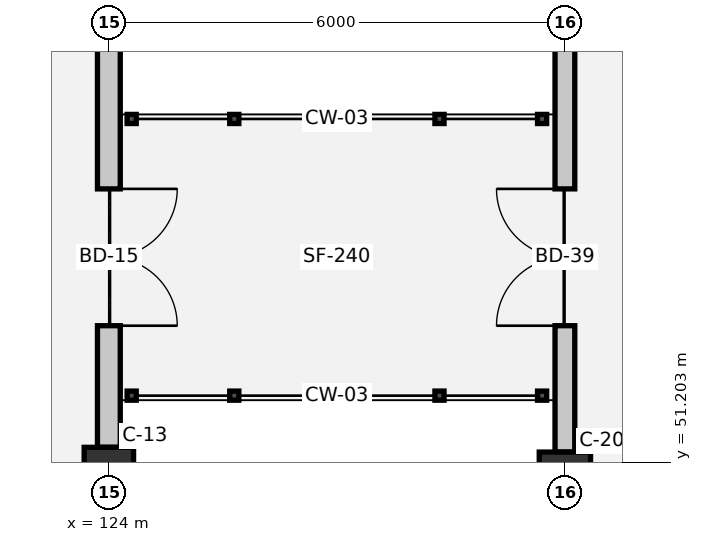
"""IFC4 building model, lengths in metres.
Left out: names, types, materials, properties, quantities, classifications, styles, units other than length and angle.
Written with IfcOpenShell. Run it as: python <this file> out.ifc"""

import sys

from ifc_helpers import new_model, si_unit, direction, frame, frame_2d, origin, origin_2d, place, context, subcontext, project, spatial, rectangle, extrude, element, fill, save


model = new_model("IFC4")
c1 = context("Model", 3, precision=1e-05, world=origin(), true_north=direction((0.0, 1.0)))
c2 = subcontext(c1, "Body", "Model", "MODEL_VIEW")
j1 = project(units=[si_unit("LENGTHUNIT", "METRE"), si_unit("PLANEANGLEUNIT", "RADIAN")], contexts=[c1])
p1 = place(None, origin())
s1 = spatial("IfcSite", under=j1, at=p1, CompositionType="ELEMENT")
p2 = place(p1, origin())
s2 = spatial("IfcBuilding", under=s1, at=p2, CompositionType="ELEMENT")
p3 = place(p2, frame((0.0, 0.0, 14.4)))
s3 = spatial("IfcBuildingStorey", under=s2, at=p3, CompositionType="ELEMENT", Elevation=14.4)
p4 = place(p3, frame((124.0, 51.0, 0.0), z_axis=(0.0, 0.0, 1.0), x_axis=(1.0, 0.0, 0.0)))
e1 = element("IfcColumn", 1, at=p4, inside=s3, PredefinedType="COLUMN", context=c2, shape_type="SweptSolid", body=[
    extrude(rectangle(XDim=0.65, YDim=0.8, at=origin_2d()), origin(), (0.0, 0.0, 1.0), 3.9),
])
p5 = place(p3, frame((130.0, 51.0, 0.0), z_axis=(0.0, 0.0, 1.0), x_axis=(1.0, 0.0, 0.0)))
e2 = element("IfcColumn", 2, at=p5, inside=s3, PredefinedType="COLUMN", context=c2, shape_type="SweptSolid", body=[
    extrude(rectangle(XDim=0.675, YDim=0.675, at=origin_2d()), origin(), (0.0, 0.0, 1.0), 3.9),
])
p6 = place(p3, frame((124.0, 64.6, 0.0), z_axis=(0.0, 0.0, 1.0), x_axis=(0.0, -1.0, 0.0)))
e3 = element("IfcWall", 3, at=p6, inside=s3, PredefinedType="SOLIDWALL", context=c2, shape_type="SweptSolid", body=[
    extrude(rectangle(XDim=13.2, YDim=0.3, at=frame_2d((6.6, 0.0))), origin(), (0.0, 0.0, 1.0), 2.61),
])
p7 = place(p6, frame((9.8, 0.0, 0.0)))
e4 = element("IfcOpeningElement", 4, at=p7, cuts=e3, PredefinedType="OPENING", context=c2, shape_type="SweptSolid", body=[
    extrude(rectangle(XDim=1.8, YDim=2.25, at=frame_2d((0.9, 1.125))), frame((0.0, 0.16, 0.0), z_axis=(0.0, -1.0, 0.0), x_axis=(1.0, 0.0, 0.0)), (0.0, 0.0, 1.0), 0.32),
])
p8 = place(p3, frame((130.0, 51.337, 0.0), z_axis=(0.0, 0.0, 1.0), x_axis=(0.0, 1.0, 0.0)))
e5 = element("IfcWall", 5, at=p8, inside=s3, PredefinedType="SOLIDWALL", context=c2, shape_type="SweptSolid", body=[
    extrude(rectangle(XDim=13.325, YDim=0.26, at=frame_2d((6.663, 0.0))), origin(), (0.0, 0.0, 1.0), 2.61),
])
p9 = place(p8, frame((1.663, 0.0, 0.0)))
e6 = element("IfcOpeningElement", 6, at=p9, cuts=e5, PredefinedType="OPENING", context=c2, shape_type="SweptSolid", body=[
    extrude(rectangle(XDim=1.8, YDim=2.25, at=frame_2d((0.9, 1.125))), frame((0.0, 0.14, 0.0), z_axis=(0.0, -1.0, 0.0), x_axis=(1.0, 0.0, 0.0)), (0.0, 0.0, 1.0), 0.28),
])
p10 = place(p7, origin())
e7 = element("IfcDoor", 7, at=p10, inside=s3, OperationType="DOUBLE_DOOR_SINGLE_SWING", PredefinedType="DOOR", context=c2, shape_type="SweptSolid", body=[
    extrude(rectangle(XDim=1.8, YDim=2.25, at=frame_2d((0.9, 1.125))), frame((0.0, 0.025, 0.0), z_axis=(0.0, -1.0, 0.0), x_axis=(1.0, 0.0, 0.0)), (0.0, 0.0, 1.0), 0.05),
])
fill(e4, e7)
p11 = place(p9, origin())
e8 = element("IfcDoor", 8, at=p11, inside=s3, OperationType="DOUBLE_DOOR_SINGLE_SWING", PredefinedType="DOOR", context=c2, shape_type="SweptSolid", body=[
    extrude(rectangle(XDim=1.8, YDim=2.25, at=frame_2d((0.9, 1.125))), frame((0.0, 0.025, 0.0), z_axis=(0.0, -1.0, 0.0), x_axis=(1.0, 0.0, 0.0)), (0.0, 0.0, 1.0), 0.05),
])
fill(e6, e8)
save(model, sys.argv[1])
